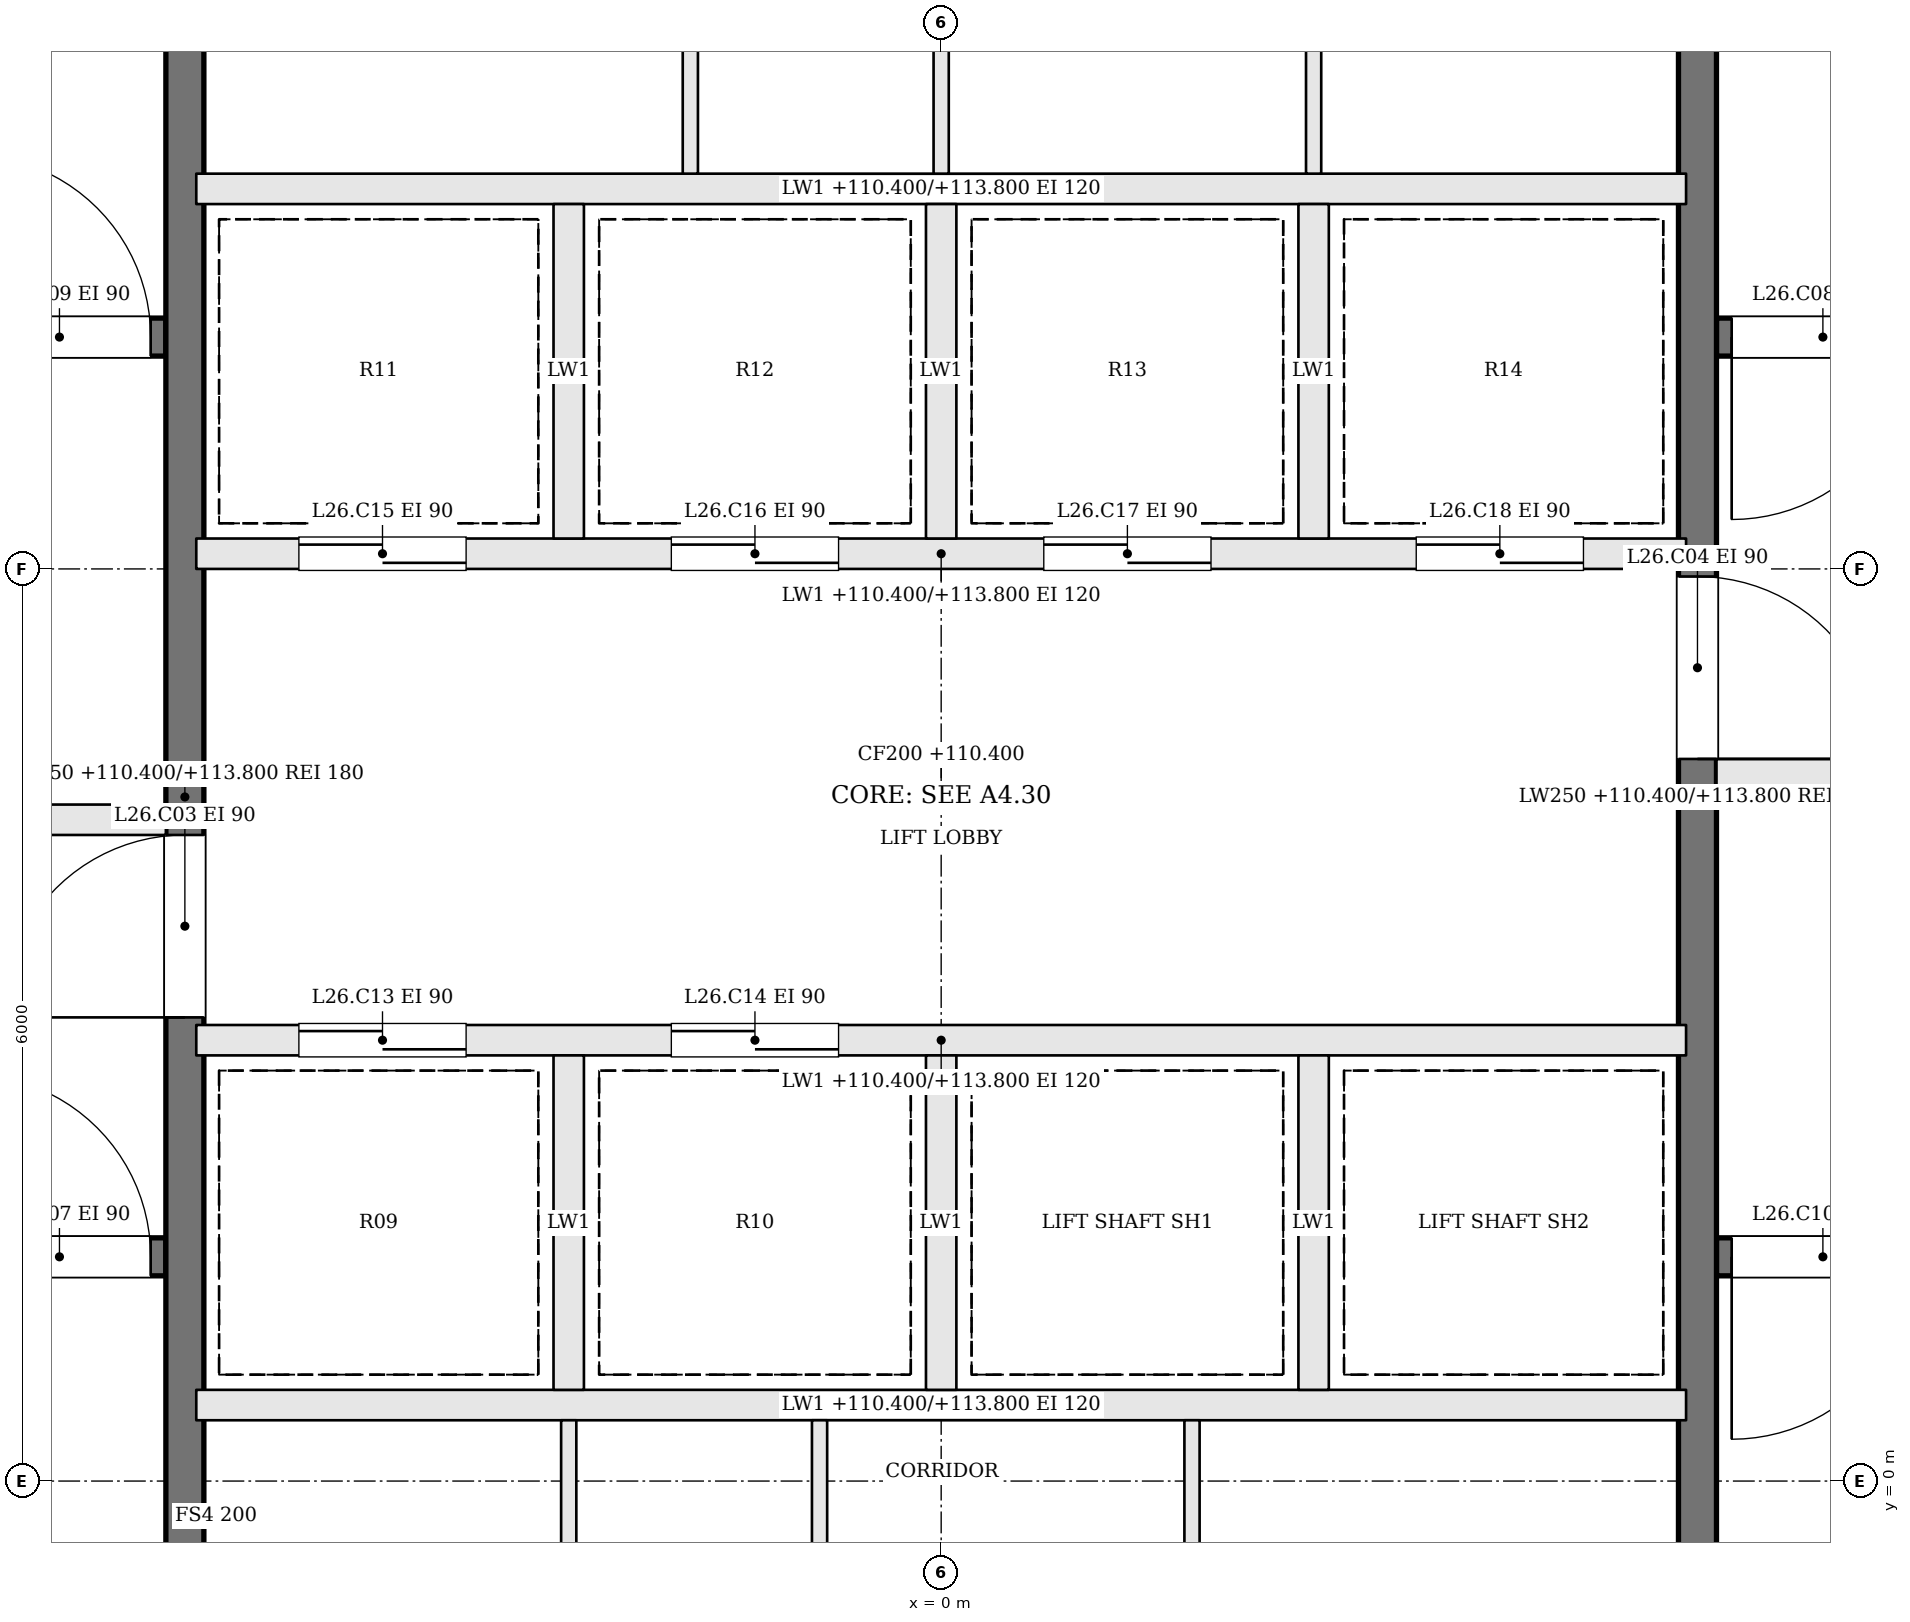
"""IFC4 building model, lengths in metres.
Left out: names, types, materials, properties, quantities, classifications, styles, units other than length and angle.
Written with IfcOpenShell. Run it as: python <this file> out.ifc"""

import sys

from ifc_helpers import new_model, si_unit, direction, frame, frame_2d, origin, place, context, subcontext, project, spatial, rectangle, extrude, element, fill, save


model = new_model("IFC4")
c1 = context("Model", 3, precision=1e-05, world=origin(), true_north=direction((0.0, 1.0)))
c2 = subcontext(c1, "Body", "Model", "MODEL_VIEW")
j1 = project(units=[si_unit("LENGTHUNIT", "METRE"), si_unit("PLANEANGLEUNIT", "RADIAN")], contexts=[c1])
p1 = place(None, origin())
s1 = spatial("IfcSite", under=j1, at=p1, CompositionType="ELEMENT")
p2 = place(p1, origin())
s2 = spatial("IfcBuilding", under=s1, at=p2, CompositionType="ELEMENT")
p3 = place(p2, frame((0.0, 0.0, 110.4)))
s3 = spatial("IfcBuildingStorey", under=s2, at=p3, CompositionType="ELEMENT", Elevation=110.4)
p4 = place(p3, frame((-11.9, 1.475, 0.0), z_axis=(0.0, 0.0, 1.0), x_axis=(1.0, 0.0, 0.0)))
e1 = element("IfcWall", 1, at=p4, inside=s3, PredefinedType="SOLIDWALL", context=c2, shape_type="SweptSolid", body=[
    extrude(rectangle(XDim=6.8, YDim=0.25, at=frame_2d((3.4, 0.0))), origin(), (0.0, 0.0, 1.0), 3.4),
])
p5 = place(p4, frame((5.5, 0.0, 0.0)))
e2 = element("IfcOpeningElement", 2, at=p5, cuts=e1, PredefinedType="OPENING", context=c2, shape_type="SweptSolid", body=[
    extrude(rectangle(XDim=1.2, YDim=2.1, at=frame_2d((0.6, 1.05))), frame((0.0, 0.135, 0.0), z_axis=(0.0, -1.0, 0.0), x_axis=(1.0, 0.0, 0.0)), (0.0, 0.0, 1.0), 0.27),
])
p6 = place(p3, frame((11.9, 7.525, 0.0), z_axis=(0.0, 0.0, 1.0), x_axis=(-1.0, 0.0, 0.0)))
e3 = element("IfcWall", 3, at=p6, inside=s3, PredefinedType="SOLIDWALL", context=c2, shape_type="SweptSolid", body=[
    extrude(rectangle(XDim=6.8, YDim=0.25, at=frame_2d((3.4, 0.0))), origin(), (0.0, 0.0, 1.0), 3.4),
])
p7 = place(p6, frame((5.5, 0.0, 0.0)))
e4 = element("IfcOpeningElement", 4, at=p7, cuts=e3, PredefinedType="OPENING", context=c2, shape_type="SweptSolid", body=[
    extrude(rectangle(XDim=1.2, YDim=2.1, at=frame_2d((0.6, 1.05))), frame((0.0, 0.135, 0.0), z_axis=(0.0, -1.0, 0.0), x_axis=(1.0, 0.0, 0.0)), (0.0, 0.0, 1.0), 0.27),
])
p8 = place(p3, frame((-11.9, 4.35, 0.0), z_axis=(0.0, 0.0, 1.0), x_axis=(1.0, 0.0, 0.0)))
e5 = element("IfcWall", 5, at=p8, inside=s3, PredefinedType="SOLIDWALL", context=c2, shape_type="SweptSolid", body=[
    extrude(rectangle(XDim=6.8, YDim=0.2, at=frame_2d((3.4, 0.0))), origin(), (0.0, 0.0, 1.0), 3.4),
])
p9 = place(p8, frame((4.1, 0.0, 0.0)))
e6 = element("IfcOpeningElement", 6, at=p9, cuts=e5, PredefinedType="OPENING", context=c2, shape_type="SweptSolid", body=[
    extrude(rectangle(XDim=1.2, YDim=2.1, at=frame_2d((0.6, 1.05))), frame((0.0, 0.11, 0.0), z_axis=(0.0, -1.0, 0.0), x_axis=(1.0, 0.0, 0.0)), (0.0, 0.0, 1.0), 0.22),
])
p10 = place(p8, frame((0.8, 0.0, 0.0)))
e7 = element("IfcOpeningElement", 7, at=p10, cuts=e5, PredefinedType="OPENING", context=c2, shape_type="SweptSolid", body=[
    extrude(rectangle(XDim=1.2, YDim=2.1, at=frame_2d((0.6, 1.05))), frame((0.0, 0.11, 0.0), z_axis=(0.0, -1.0, 0.0), x_axis=(1.0, 0.0, 0.0)), (0.0, 0.0, 1.0), 0.22),
])
p11 = place(p3, frame((11.9, 4.65, 0.0), z_axis=(0.0, 0.0, 1.0), x_axis=(-1.0, 0.0, 0.0)))
e8 = element("IfcWall", 8, at=p11, inside=s3, PredefinedType="SOLIDWALL", context=c2, shape_type="SweptSolid", body=[
    extrude(rectangle(XDim=6.8, YDim=0.2, at=frame_2d((3.4, 0.0))), origin(), (0.0, 0.0, 1.0), 3.4),
])
p12 = place(p11, frame((4.1, 0.0, 0.0)))
e9 = element("IfcOpeningElement", 9, at=p12, cuts=e8, PredefinedType="OPENING", context=c2, shape_type="SweptSolid", body=[
    extrude(rectangle(XDim=1.2, YDim=2.1, at=frame_2d((0.6, 1.05))), frame((0.0, 0.11, 0.0), z_axis=(0.0, -1.0, 0.0), x_axis=(1.0, 0.0, 0.0)), (0.0, 0.0, 1.0), 0.22),
])
p13 = place(p11, frame((0.8, 0.0, 0.0)))
e10 = element("IfcOpeningElement", 10, at=p13, cuts=e8, PredefinedType="OPENING", context=c2, shape_type="SweptSolid", body=[
    extrude(rectangle(XDim=1.2, YDim=2.1, at=frame_2d((0.6, 1.05))), frame((0.0, 0.11, 0.0), z_axis=(0.0, -1.0, 0.0), x_axis=(1.0, 0.0, 0.0)), (0.0, 0.0, 1.0), 0.22),
])
p14 = place(p3, frame((-11.9, 7.525, 0.0), z_axis=(0.0, 0.0, 1.0), x_axis=(1.0, 0.0, 0.0)))
e11 = element("IfcWall", 11, at=p14, inside=s3, PredefinedType="SOLIDWALL", context=c2, shape_type="SweptSolid", body=[
    extrude(rectangle(XDim=6.8, YDim=0.25, at=frame_2d((3.4, 0.0))), origin(), (0.0, 0.0, 1.0), 3.4),
])
p15 = place(p14, frame((5.5, 0.0, 0.0)))
e12 = element("IfcOpeningElement", 12, at=p15, cuts=e11, PredefinedType="OPENING", context=c2, shape_type="SweptSolid", body=[
    extrude(rectangle(XDim=1.2, YDim=2.1, at=frame_2d((0.6, 1.05))), frame((0.0, 0.135, 0.0), z_axis=(0.0, -1.0, 0.0), x_axis=(1.0, 0.0, 0.0)), (0.0, 0.0, 1.0), 0.27),
])
p16 = place(p3, frame((11.9, 1.475, 0.0), z_axis=(0.0, 0.0, 1.0), x_axis=(-1.0, 0.0, 0.0)))
e13 = element("IfcWall", 13, at=p16, inside=s3, PredefinedType="SOLIDWALL", context=c2, shape_type="SweptSolid", body=[
    extrude(rectangle(XDim=6.8, YDim=0.25, at=frame_2d((3.4, 0.0))), origin(), (0.0, 0.0, 1.0), 3.4),
])
p17 = place(p16, frame((5.5, 0.0, 0.0)))
e14 = element("IfcOpeningElement", 14, at=p17, cuts=e13, PredefinedType="OPENING", context=c2, shape_type="SweptSolid", body=[
    extrude(rectangle(XDim=1.2, YDim=2.1, at=frame_2d((0.6, 1.05))), frame((0.0, 0.135, 0.0), z_axis=(0.0, -1.0, 0.0), x_axis=(1.0, 0.0, 0.0)), (0.0, 0.0, 1.0), 0.27),
])
p18 = place(p3, frame((-4.975, -1.9, 0.0), z_axis=(0.0, 0.0, 1.0), x_axis=(0.0, 1.0, 0.0)))
e15 = element("IfcWall", 15, at=p18, inside=s3, PredefinedType="SOLIDWALL", context=c2, shape_type="SweptSolid", body=[
    extrude(rectangle(XDim=12.8, YDim=0.25, at=frame_2d((6.4, 0.0))), origin(), (0.0, 0.0, 1.0), 3.4),
])
p19 = place(p18, frame((4.95, 0.0, 0.0)))
e16 = element("IfcOpeningElement", 16, at=p19, cuts=e15, PredefinedType="OPENING", context=c2, shape_type="SweptSolid", body=[
    extrude(rectangle(XDim=1.2, YDim=2.1, at=frame_2d((0.6, 1.05))), frame((0.0, 0.135, 0.0), z_axis=(0.0, -1.0, 0.0), x_axis=(1.0, 0.0, 0.0)), (0.0, 0.0, 1.0), 0.27),
])
p20 = place(p3, frame((4.975, 10.9, 0.0), z_axis=(0.0, 0.0, 1.0), x_axis=(0.0, -1.0, 0.0)))
e17 = element("IfcWall", 17, at=p20, inside=s3, PredefinedType="SOLIDWALL", context=c2, shape_type="SweptSolid", body=[
    extrude(rectangle(XDim=12.8, YDim=0.25, at=frame_2d((6.4, 0.0))), origin(), (0.0, 0.0, 1.0), 3.4),
])
p21 = place(p20, frame((4.95, 0.0, 0.0)))
e18 = element("IfcOpeningElement", 18, at=p21, cuts=e17, PredefinedType="OPENING", context=c2, shape_type="SweptSolid", body=[
    extrude(rectangle(XDim=1.2, YDim=2.1, at=frame_2d((0.6, 1.05))), frame((0.0, 0.135, 0.0), z_axis=(0.0, -1.0, 0.0), x_axis=(1.0, 0.0, 0.0)), (0.0, 0.0, 1.0), 0.27),
])
p22 = place(p3, frame((-4.9, 0.5, 0.0), z_axis=(0.0, 0.0, 1.0), x_axis=(1.0, 0.0, 0.0)))
e19 = element("IfcWall", 19, at=p22, inside=s3, PredefinedType="SOLIDWALL", context=c2, shape_type="SweptSolid", body=[
    extrude(rectangle(XDim=9.8, YDim=0.2, at=frame_2d((4.9, 0.0))), origin(), (0.0, 0.0, 1.0), 3.4),
])
p23 = place(p3, frame((-4.9, 2.9, 0.0), z_axis=(0.0, 0.0, 1.0), x_axis=(1.0, 0.0, 0.0)))
e20 = element("IfcWall", 20, at=p23, inside=s3, PredefinedType="SOLIDWALL", context=c2, shape_type="SweptSolid", body=[
    extrude(rectangle(XDim=9.8, YDim=0.2, at=frame_2d((4.9, 0.0))), origin(), (0.0, 0.0, 1.0), 3.4),
])
p24 = place(p23, frame((0.675, 0.0, 0.0)))
e21 = element("IfcOpeningElement", 21, at=p24, cuts=e20, PredefinedType="OPENING", context=c2, shape_type="SweptSolid", body=[
    extrude(rectangle(XDim=1.1, YDim=2.1, at=frame_2d((0.55, 1.05))), frame((0.0, 0.11, 0.0), z_axis=(0.0, -1.0, 0.0), x_axis=(1.0, 0.0, 0.0)), (0.0, 0.0, 1.0), 0.22),
])
p25 = place(p23, frame((3.125, 0.0, 0.0)))
e22 = element("IfcOpeningElement", 22, at=p25, cuts=e20, PredefinedType="OPENING", context=c2, shape_type="SweptSolid", body=[
    extrude(rectangle(XDim=1.1, YDim=2.1, at=frame_2d((0.55, 1.05))), frame((0.0, 0.11, 0.0), z_axis=(0.0, -1.0, 0.0), x_axis=(1.0, 0.0, 0.0)), (0.0, 0.0, 1.0), 0.22),
])
p26 = place(p3, frame((-4.9, 6.1, 0.0), z_axis=(0.0, 0.0, 1.0), x_axis=(1.0, 0.0, 0.0)))
e23 = element("IfcWall", 23, at=p26, inside=s3, PredefinedType="SOLIDWALL", context=c2, shape_type="SweptSolid", body=[
    extrude(rectangle(XDim=9.8, YDim=0.2, at=frame_2d((4.9, 0.0))), origin(), (0.0, 0.0, 1.0), 3.4),
])
p27 = place(p26, frame((0.675, 0.0, 0.0)))
e24 = element("IfcOpeningElement", 24, at=p27, cuts=e23, PredefinedType="OPENING", context=c2, shape_type="SweptSolid", body=[
    extrude(rectangle(XDim=1.1, YDim=2.1, at=frame_2d((0.55, 1.05))), frame((0.0, 0.11, 0.0), z_axis=(0.0, -1.0, 0.0), x_axis=(1.0, 0.0, 0.0)), (0.0, 0.0, 1.0), 0.22),
])
p28 = place(p26, frame((3.125, 0.0, 0.0)))
e25 = element("IfcOpeningElement", 25, at=p28, cuts=e23, PredefinedType="OPENING", context=c2, shape_type="SweptSolid", body=[
    extrude(rectangle(XDim=1.1, YDim=2.1, at=frame_2d((0.55, 1.05))), frame((0.0, 0.11, 0.0), z_axis=(0.0, -1.0, 0.0), x_axis=(1.0, 0.0, 0.0)), (0.0, 0.0, 1.0), 0.22),
])
p29 = place(p26, frame((5.575, 0.0, 0.0)))
e26 = element("IfcOpeningElement", 26, at=p29, cuts=e23, PredefinedType="OPENING", context=c2, shape_type="SweptSolid", body=[
    extrude(rectangle(XDim=1.1, YDim=2.1, at=frame_2d((0.55, 1.05))), frame((0.0, 0.11, 0.0), z_axis=(0.0, -1.0, 0.0), x_axis=(1.0, 0.0, 0.0)), (0.0, 0.0, 1.0), 0.22),
])
p30 = place(p26, frame((8.025, 0.0, 0.0)))
e27 = element("IfcOpeningElement", 27, at=p30, cuts=e23, PredefinedType="OPENING", context=c2, shape_type="SweptSolid", body=[
    extrude(rectangle(XDim=1.1, YDim=2.1, at=frame_2d((0.55, 1.05))), frame((0.0, 0.11, 0.0), z_axis=(0.0, -1.0, 0.0), x_axis=(1.0, 0.0, 0.0)), (0.0, 0.0, 1.0), 0.22),
])
p31 = place(p3, frame((-4.9, 8.5, 0.0), z_axis=(0.0, 0.0, 1.0), x_axis=(1.0, 0.0, 0.0)))
e28 = element("IfcWall", 28, at=p31, inside=s3, PredefinedType="SOLIDWALL", context=c2, shape_type="SweptSolid", body=[
    extrude(rectangle(XDim=9.8, YDim=0.2, at=frame_2d((4.9, 0.0))), origin(), (0.0, 0.0, 1.0), 3.4),
])
for number, where, z_axis, x_axis in (
    (29, (-2.45, 0.6, 0.0), (0.0, 0.0, 1.0), (0.0, 1.0, 0.0)),
    (30, (0.0, 0.6, 0.0), (0.0, 0.0, 1.0), (0.0, 1.0, 0.0)),
    (31, (2.45, 0.6, 0.0), (0.0, 0.0, 1.0), (0.0, 1.0, 0.0)),
    (32, (-2.45, 6.2, 0.0), (0.0, 0.0, 1.0), (0.0, 1.0, 0.0)),
    (33, (0.0, 6.2, 0.0), (0.0, 0.0, 1.0), (0.0, 1.0, 0.0)),
    (34, (2.45, 6.2, 0.0), (0.0, 0.0, 1.0), (0.0, 1.0, 0.0)),
):
    element("IfcWall", number, at=place(p3, frame(where, z_axis=z_axis, x_axis=x_axis)), inside=s3, PredefinedType="SOLIDWALL", context=c2, shape_type="SweptSolid", body=[
        extrude(rectangle(XDim=2.2, YDim=0.2, at=frame_2d((1.1, 0.0))), origin(), (0.0, 0.0, 1.0), 3.4),
    ])
for number, where, z_axis, x_axis in (
    (35, (-2.45, -1.9, 0.0), (0.0, 0.0, 1.0), (0.0, 1.0, 0.0)),
    (36, (-0.8, -1.9, 0.0), (0.0, 0.0, 1.0), (0.0, 1.0, 0.0)),
    (37, (1.65, -1.9, 0.0), (0.0, 0.0, 1.0), (0.0, 1.0, 0.0)),
    (38, (-1.65, 8.6, 0.0), (0.0, 0.0, 1.0), (0.0, 1.0, 0.0)),
    (39, (0.0, 8.6, 0.0), (0.0, 0.0, 1.0), (0.0, 1.0, 0.0)),
    (40, (2.45, 8.6, 0.0), (0.0, 0.0, 1.0), (0.0, 1.0, 0.0)),
):
    element("IfcWall", number, at=place(p3, frame(where, z_axis=z_axis, x_axis=x_axis)), inside=s3, PredefinedType="PARTITIONING", context=c2, shape_type="SweptSolid", body=[
        extrude(rectangle(XDim=2.3, YDim=0.1, at=frame_2d((1.15, 0.0))), origin(), (0.0, 0.0, 1.0), 3.4),
    ])
p32 = place(p19, origin())
e41 = element("IfcDoor", 41, at=p32, inside=s3, OperationType="SINGLE_SWING_LEFT", PredefinedType="DOOR", context=c2, shape_type="SweptSolid", body=[
    extrude(rectangle(XDim=1.2, YDim=2.1, at=frame_2d((0.6, 1.05))), frame((0.0, 0.025, 0.0), z_axis=(0.0, -1.0, 0.0), x_axis=(1.0, 0.0, 0.0)), (0.0, 0.0, 1.0), 0.05),
])
fill(e16, e41)
p33 = place(p21, origin())
e42 = element("IfcDoor", 42, at=p33, inside=s3, OperationType="SINGLE_SWING_RIGHT", PredefinedType="DOOR", context=c2, shape_type="SweptSolid", body=[
    extrude(rectangle(XDim=1.2, YDim=2.1, at=frame_2d((0.6, 1.05))), frame((0.0, 0.025, 0.0), z_axis=(0.0, -1.0, 0.0), x_axis=(1.0, 0.0, 0.0)), (0.0, 0.0, 1.0), 0.05),
])
fill(e18, e42)
p34 = place(p5, origin())
e43 = element("IfcDoor", 43, at=p34, inside=s3, OperationType="SINGLE_SWING_LEFT", PredefinedType="DOOR", context=c2, shape_type="SweptSolid", body=[
    extrude(rectangle(XDim=1.2, YDim=2.1, at=frame_2d((0.6, 1.05))), frame((0.0, 0.025, 0.0), z_axis=(0.0, -1.0, 0.0), x_axis=(1.0, 0.0, 0.0)), (0.0, 0.0, 1.0), 0.05),
])
fill(e2, e43)
p35 = place(p7, origin())
e44 = element("IfcDoor", 44, at=p35, inside=s3, OperationType="SINGLE_SWING_RIGHT", PredefinedType="DOOR", context=c2, shape_type="SweptSolid", body=[
    extrude(rectangle(XDim=1.2, YDim=2.1, at=frame_2d((0.6, 1.05))), frame((0.0, 0.025, 0.0), z_axis=(0.0, -1.0, 0.0), x_axis=(1.0, 0.0, 0.0)), (0.0, 0.0, 1.0), 0.05),
])
fill(e4, e44)
p36 = place(p15, origin())
e45 = element("IfcDoor", 45, at=p36, inside=s3, OperationType="SINGLE_SWING_LEFT", PredefinedType="DOOR", context=c2, shape_type="SweptSolid", body=[
    extrude(rectangle(XDim=1.2, YDim=2.1, at=frame_2d((0.6, 1.05))), frame((0.0, 0.025, 0.0), z_axis=(0.0, -1.0, 0.0), x_axis=(1.0, 0.0, 0.0)), (0.0, 0.0, 1.0), 0.05),
])
fill(e12, e45)
p37 = place(p17, origin())
e46 = element("IfcDoor", 46, at=p37, inside=s3, OperationType="SINGLE_SWING_RIGHT", PredefinedType="DOOR", context=c2, shape_type="SweptSolid", body=[
    extrude(rectangle(XDim=1.2, YDim=2.1, at=frame_2d((0.6, 1.05))), frame((0.0, 0.025, 0.0), z_axis=(0.0, -1.0, 0.0), x_axis=(1.0, 0.0, 0.0)), (0.0, 0.0, 1.0), 0.05),
])
fill(e14, e46)
p38 = place(p24, origin())
e47 = element("IfcDoor", 47, at=p38, inside=s3, OperationType="SLIDING_TO_RIGHT", PredefinedType="DOOR", context=c2, shape_type="SweptSolid", body=[
    extrude(rectangle(XDim=1.1, YDim=2.1, at=frame_2d((0.55, 1.05))), frame((0.0, 0.025, 0.0), z_axis=(0.0, -1.0, 0.0), x_axis=(1.0, 0.0, 0.0)), (0.0, 0.0, 1.0), 0.05),
])
fill(e21, e47)
p39 = place(p25, origin())
e48 = element("IfcDoor", 48, at=p39, inside=s3, OperationType="SLIDING_TO_LEFT", PredefinedType="DOOR", context=c2, shape_type="SweptSolid", body=[
    extrude(rectangle(XDim=1.1, YDim=2.1, at=frame_2d((0.55, 1.05))), frame((0.0, 0.025, 0.0), z_axis=(0.0, -1.0, 0.0), x_axis=(1.0, 0.0, 0.0)), (0.0, 0.0, 1.0), 0.05),
])
fill(e22, e48)
p40 = place(p27, origin())
e49 = element("IfcDoor", 49, at=p40, inside=s3, OperationType="SLIDING_TO_RIGHT", PredefinedType="DOOR", context=c2, shape_type="SweptSolid", body=[
    extrude(rectangle(XDim=1.1, YDim=2.1, at=frame_2d((0.55, 1.05))), frame((0.0, 0.025, 0.0), z_axis=(0.0, -1.0, 0.0), x_axis=(1.0, 0.0, 0.0)), (0.0, 0.0, 1.0), 0.05),
])
fill(e24, e49)
p41 = place(p28, origin())
e50 = element("IfcDoor", 50, at=p41, inside=s3, OperationType="SLIDING_TO_LEFT", PredefinedType="DOOR", context=c2, shape_type="SweptSolid", body=[
    extrude(rectangle(XDim=1.1, YDim=2.1, at=frame_2d((0.55, 1.05))), frame((0.0, 0.025, 0.0), z_axis=(0.0, -1.0, 0.0), x_axis=(1.0, 0.0, 0.0)), (0.0, 0.0, 1.0), 0.05),
])
fill(e25, e50)
p42 = place(p29, origin())
e51 = element("IfcDoor", 51, at=p42, inside=s3, OperationType="SLIDING_TO_RIGHT", PredefinedType="DOOR", context=c2, shape_type="SweptSolid", body=[
    extrude(rectangle(XDim=1.1, YDim=2.1, at=frame_2d((0.55, 1.05))), frame((0.0, 0.025, 0.0), z_axis=(0.0, -1.0, 0.0), x_axis=(1.0, 0.0, 0.0)), (0.0, 0.0, 1.0), 0.05),
])
fill(e26, e51)
p43 = place(p30, origin())
e52 = element("IfcDoor", 52, at=p43, inside=s3, OperationType="SLIDING_TO_LEFT", PredefinedType="DOOR", context=c2, shape_type="SweptSolid", body=[
    extrude(rectangle(XDim=1.1, YDim=2.1, at=frame_2d((0.55, 1.05))), frame((0.0, 0.025, 0.0), z_axis=(0.0, -1.0, 0.0), x_axis=(1.0, 0.0, 0.0)), (0.0, 0.0, 1.0), 0.05),
])
fill(e27, e52)
save(model, sys.argv[1])
